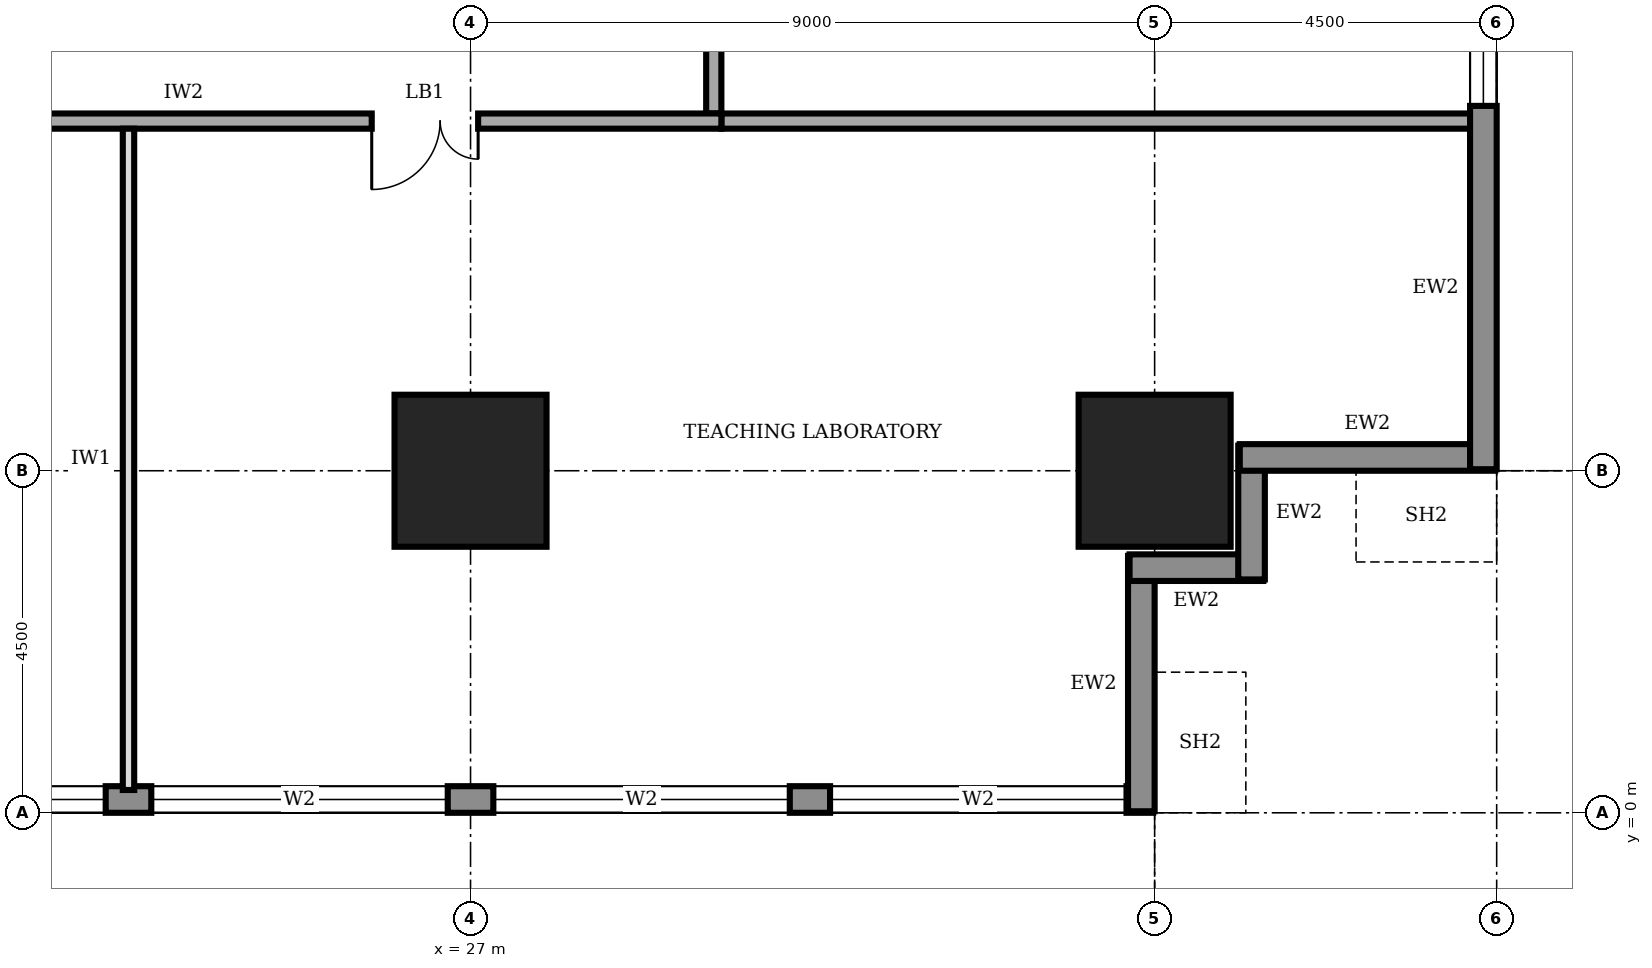
"""IFC4 building model, lengths in metres.
Left out: names, types, materials, properties, quantities, classifications, styles, units other than length and angle.
Written with IfcOpenShell. Run it as: python <this file> out.ifc"""

import sys

from ifc_helpers import new_model, si_unit, direction, frame, frame_2d, origin, origin_2d, place, context, subcontext, project, spatial, rectangle, extrude, element, fill, save


model = new_model("IFC4")
c1 = context("Model", 3, precision=1e-05, world=origin(), true_north=direction((0.0, 1.0)))
c2 = subcontext(c1, "Body", "Model", "MODEL_VIEW")
j1 = project(units=[si_unit("LENGTHUNIT", "METRE"), si_unit("PLANEANGLEUNIT", "RADIAN")], contexts=[c1])
p1 = place(None, origin())
s1 = spatial("IfcSite", under=j1, at=p1, CompositionType="ELEMENT")
p2 = place(p1, origin())
s2 = spatial("IfcBuilding", under=s1, at=p2, CompositionType="ELEMENT")
p3 = place(p2, frame((0.0, 0.0, 65.0)))
s3 = spatial("IfcBuildingStorey", under=s2, at=p3, CompositionType="ELEMENT", Elevation=65.0)
for number, where, z_axis, x_axis in (
    (1, (27.0, 4.5, 0.0), (0.0, 0.0, 1.0), (1.0, 0.0, 0.0)),
    (2, (36.0, 4.5, 0.0), (0.0, 0.0, 1.0), (1.0, 0.0, 0.0)),
):
    element("IfcColumn", number, at=place(p3, frame(where, z_axis=z_axis, x_axis=x_axis)), inside=s3, PredefinedType="COLUMN", context=c2, shape_type="SweptSolid", body=[
        extrude(rectangle(XDim=2.0, YDim=2.0, at=origin_2d()), origin(), (0.0, 0.0, 1.0), 4.0),
    ])
p4 = place(p3, frame((4.52, 0.175, 0.0), z_axis=(0.0, 0.0, 1.0), x_axis=(1.0, 0.0, 0.0)))
e3 = element("IfcWall", 3, at=p4, inside=s3, PredefinedType="STANDARD", context=c2, shape_type="SweptSolid", body=[
    extrude(rectangle(XDim=31.46, YDim=0.35, at=frame_2d((15.73, 0.0))), origin(), (0.0, 0.0, 1.0), 3.75),
])
p5 = place(p4, frame((4.78, 0.0, 0.6)))
e4 = element("IfcOpeningElement", 4, at=p5, cuts=e3, PredefinedType="OPENING", context=c2, shape_type="SweptSolid", body=[
    extrude(rectangle(XDim=3.9, YDim=2.6, at=frame_2d((1.95, 1.3))), frame((0.0, 0.185, 0.0), z_axis=(0.0, -1.0, 0.0), x_axis=(1.0, 0.0, 0.0)), (0.0, 0.0, 1.0), 0.37),
])
p6 = place(p4, frame((9.28, 0.0, 0.6)))
e5 = element("IfcOpeningElement", 5, at=p6, cuts=e3, PredefinedType="OPENING", context=c2, shape_type="SweptSolid", body=[
    extrude(rectangle(XDim=3.9, YDim=2.6, at=frame_2d((1.95, 1.3))), frame((0.0, 0.185, 0.0), z_axis=(0.0, -1.0, 0.0), x_axis=(1.0, 0.0, 0.0)), (0.0, 0.0, 1.0), 0.37),
])
p7 = place(p4, frame((13.78, 0.0, 0.6)))
e6 = element("IfcOpeningElement", 6, at=p7, cuts=e3, PredefinedType="OPENING", context=c2, shape_type="SweptSolid", body=[
    extrude(rectangle(XDim=3.9, YDim=2.6, at=frame_2d((1.95, 1.3))), frame((0.0, 0.185, 0.0), z_axis=(0.0, -1.0, 0.0), x_axis=(1.0, 0.0, 0.0)), (0.0, 0.0, 1.0), 0.37),
])
p8 = place(p4, frame((18.28, 0.0, 0.6)))
e7 = element("IfcOpeningElement", 7, at=p8, cuts=e3, PredefinedType="OPENING", context=c2, shape_type="SweptSolid", body=[
    extrude(rectangle(XDim=3.9, YDim=2.6, at=frame_2d((1.95, 1.3))), frame((0.0, 0.185, 0.0), z_axis=(0.0, -1.0, 0.0), x_axis=(1.0, 0.0, 0.0)), (0.0, 0.0, 1.0), 0.37),
])
p9 = place(p4, frame((22.78, 0.0, 0.6)))
e8 = element("IfcOpeningElement", 8, at=p9, cuts=e3, PredefinedType="OPENING", context=c2, shape_type="SweptSolid", body=[
    extrude(rectangle(XDim=3.9, YDim=2.6, at=frame_2d((1.95, 1.3))), frame((0.0, 0.185, 0.0), z_axis=(0.0, -1.0, 0.0), x_axis=(1.0, 0.0, 0.0)), (0.0, 0.0, 1.0), 0.37),
])
p10 = place(p4, frame((27.21, 0.0, 0.6)))
e9 = element("IfcOpeningElement", 9, at=p10, cuts=e3, PredefinedType="OPENING", context=c2, shape_type="SweptSolid", body=[
    extrude(rectangle(XDim=3.9, YDim=2.6, at=frame_2d((1.95, 1.3))), frame((0.0, 0.185, 0.0), z_axis=(0.0, -1.0, 0.0), x_axis=(1.0, 0.0, 0.0)), (0.0, 0.0, 1.0), 0.37),
])
p11 = place(p3, frame((35.825, 0.02, 0.0), z_axis=(0.0, 0.0, 1.0), x_axis=(0.0, 1.0, 0.0)))
e10 = element("IfcWall", 10, at=p11, inside=s3, PredefinedType="STANDARD", context=c2, shape_type="SweptSolid", body=[
    extrude(rectangle(XDim=3.36, YDim=0.35, at=frame_2d((1.68, 0.0))), origin(), (0.0, 0.0, 1.0), 2.85),
])
for number, where, z_axis, x_axis in (
    (11, (35.67, 3.225, 0.0), (0.0, 0.0, 1.0), (1.0, 0.0, 0.0)),
    (12, (37.275, 3.07, 0.0), (0.0, 0.0, 1.0), (0.0, 1.0, 0.0)),
):
    element("IfcWall", number, at=place(p3, frame(where, z_axis=z_axis, x_axis=x_axis)), inside=s3, PredefinedType="STANDARD", context=c2, shape_type="SweptSolid", body=[
        extrude(rectangle(XDim=1.76, YDim=0.35, at=frame_2d((0.88, 0.0))), origin(), (0.0, 0.0, 1.0), 3.75),
    ])
p12 = place(p3, frame((37.12, 4.675, 0.0), z_axis=(0.0, 0.0, 1.0), x_axis=(1.0, 0.0, 0.0)))
e13 = element("IfcWall", 13, at=p12, inside=s3, PredefinedType="STANDARD", context=c2, shape_type="SweptSolid", body=[
    extrude(rectangle(XDim=3.36, YDim=0.35, at=frame_2d((1.68, 0.0))), origin(), (0.0, 0.0, 1.0), 2.85),
])
p13 = place(p3, frame((40.325, 4.52, 0.0), z_axis=(0.0, 0.0, 1.0), x_axis=(0.0, 1.0, 0.0)))
e14 = element("IfcWall", 14, at=p13, inside=s3, PredefinedType="STANDARD", context=c2, shape_type="SweptSolid", body=[
    extrude(rectangle(XDim=31.46, YDim=0.35, at=frame_2d((15.73, 0.0))), origin(), (0.0, 0.0, 1.0), 3.75),
])
p14 = place(p13, frame((4.78, 0.0, 0.6)))
e15 = element("IfcOpeningElement", 15, at=p14, cuts=e14, PredefinedType="OPENING", context=c2, shape_type="SweptSolid", body=[
    extrude(rectangle(XDim=3.9, YDim=2.6, at=frame_2d((1.95, 1.3))), frame((0.0, 0.185, 0.0), z_axis=(0.0, -1.0, 0.0), x_axis=(1.0, 0.0, 0.0)), (0.0, 0.0, 1.0), 0.37),
])
p15 = place(p13, frame((9.28, 0.0, 0.6)))
e16 = element("IfcOpeningElement", 16, at=p15, cuts=e14, PredefinedType="OPENING", context=c2, shape_type="SweptSolid", body=[
    extrude(rectangle(XDim=3.9, YDim=2.6, at=frame_2d((1.95, 1.3))), frame((0.0, 0.185, 0.0), z_axis=(0.0, -1.0, 0.0), x_axis=(1.0, 0.0, 0.0)), (0.0, 0.0, 1.0), 0.37),
])
p16 = place(p13, frame((13.78, 0.0, 0.6)))
e17 = element("IfcOpeningElement", 17, at=p16, cuts=e14, PredefinedType="OPENING", context=c2, shape_type="SweptSolid", body=[
    extrude(rectangle(XDim=3.9, YDim=2.6, at=frame_2d((1.95, 1.3))), frame((0.0, 0.185, 0.0), z_axis=(0.0, -1.0, 0.0), x_axis=(1.0, 0.0, 0.0)), (0.0, 0.0, 1.0), 0.37),
])
p17 = place(p13, frame((18.28, 0.0, 0.6)))
e18 = element("IfcOpeningElement", 18, at=p17, cuts=e14, PredefinedType="OPENING", context=c2, shape_type="SweptSolid", body=[
    extrude(rectangle(XDim=3.9, YDim=2.6, at=frame_2d((1.95, 1.3))), frame((0.0, 0.185, 0.0), z_axis=(0.0, -1.0, 0.0), x_axis=(1.0, 0.0, 0.0)), (0.0, 0.0, 1.0), 0.37),
])
p18 = place(p13, frame((22.78, 0.0, 0.6)))
e19 = element("IfcOpeningElement", 19, at=p18, cuts=e14, PredefinedType="OPENING", context=c2, shape_type="SweptSolid", body=[
    extrude(rectangle(XDim=3.9, YDim=2.6, at=frame_2d((1.95, 1.3))), frame((0.0, 0.185, 0.0), z_axis=(0.0, -1.0, 0.0), x_axis=(1.0, 0.0, 0.0)), (0.0, 0.0, 1.0), 0.37),
])
p19 = place(p13, frame((27.21, 0.0, 0.6)))
e20 = element("IfcOpeningElement", 20, at=p19, cuts=e14, PredefinedType="OPENING", context=c2, shape_type="SweptSolid", body=[
    extrude(rectangle(XDim=3.9, YDim=2.6, at=frame_2d((1.95, 1.3))), frame((0.0, 0.185, 0.0), z_axis=(0.0, -1.0, 0.0), x_axis=(1.0, 0.0, 0.0)), (0.0, 0.0, 1.0), 0.37),
])
p20 = place(p3, frame((11.9, 9.1, 0.0), z_axis=(0.0, 0.0, 1.0), x_axis=(1.0, 0.0, 0.0)))
e21 = element("IfcWall", 21, at=p20, inside=s3, PredefinedType="SOLIDWALL", context=c2, shape_type="SweptSolid", body=[
    extrude(rectangle(XDim=18.4, YDim=0.2, at=frame_2d((9.2, 0.0))), origin(), (0.0, 0.0, 1.0), 3.75),
])
p21 = place(p20, frame((2.25, 0.0, 0.0)))
e22 = element("IfcOpeningElement", 22, at=p21, cuts=e21, PredefinedType="OPENING", context=c2, shape_type="SweptSolid", body=[
    extrude(rectangle(XDim=1.4, YDim=2.1, at=frame_2d((0.7, 1.05))), frame((0.0, 0.11, 0.0), z_axis=(0.0, -1.0, 0.0), x_axis=(1.0, 0.0, 0.0)), (0.0, 0.0, 1.0), 0.22),
])
p22 = place(p20, frame((7.85, 0.0, 0.0)))
e23 = element("IfcOpeningElement", 23, at=p22, cuts=e21, PredefinedType="OPENING", context=c2, shape_type="SweptSolid", body=[
    extrude(rectangle(XDim=1.0, YDim=2.1, at=frame_2d((0.5, 1.05))), frame((0.0, 0.11, 0.0), z_axis=(0.0, -1.0, 0.0), x_axis=(1.0, 0.0, 0.0)), (0.0, 0.0, 1.0), 0.22),
])
p23 = place(p20, frame((13.8, 0.0, 0.0)))
e24 = element("IfcOpeningElement", 24, at=p23, cuts=e21, PredefinedType="OPENING", context=c2, shape_type="SweptSolid", body=[
    extrude(rectangle(XDim=1.4, YDim=2.1, at=frame_2d((0.7, 1.05))), frame((0.0, 0.11, 0.0), z_axis=(0.0, -1.0, 0.0), x_axis=(1.0, 0.0, 0.0)), (0.0, 0.0, 1.0), 0.22),
])
p24 = place(p3, frame((30.2, 9.2, 0.0), z_axis=(0.0, 0.0, 1.0), x_axis=(0.0, 1.0, 0.0)))
e25 = element("IfcWall", 25, at=p24, inside=s3, PredefinedType="SOLIDWALL", context=c2, shape_type="SweptSolid", body=[
    extrude(rectangle(XDim=22.3, YDim=0.2, at=frame_2d((11.15, 0.0))), origin(), (0.0, 0.0, 1.0), 3.75),
])
p25 = place(p24, frame((5.85, 0.0, 0.0)))
e26 = element("IfcOpeningElement", 26, at=p25, cuts=e25, PredefinedType="OPENING", context=c2, shape_type="SweptSolid", body=[
    extrude(rectangle(XDim=1.4, YDim=2.1, at=frame_2d((0.7, 1.05))), frame((0.0, 0.11, 0.0), z_axis=(0.0, -1.0, 0.0), x_axis=(1.0, 0.0, 0.0)), (0.0, 0.0, 1.0), 0.22),
])
p26 = place(p24, frame((17.3, 0.0, 0.0)))
e27 = element("IfcOpeningElement", 27, at=p26, cuts=e25, PredefinedType="OPENING", context=c2, shape_type="SweptSolid", body=[
    extrude(rectangle(XDim=1.0, YDim=2.1, at=frame_2d((0.5, 1.05))), frame((0.0, 0.11, 0.0), z_axis=(0.0, -1.0, 0.0), x_axis=(1.0, 0.0, 0.0)), (0.0, 0.0, 1.0), 0.22),
])
p27 = place(p3, frame((30.3, 9.1, 0.0), z_axis=(0.0, 0.0, 1.0), x_axis=(1.0, 0.0, 0.0)))
e28 = element("IfcWall", 28, at=p27, inside=s3, PredefinedType="SOLIDWALL", context=c2, shape_type="SweptSolid", body=[
    extrude(rectangle(XDim=9.9, YDim=0.2, at=frame_2d((4.95, 0.0))), origin(), (0.0, 0.0, 1.0), 3.75),
])
p28 = place(p3, frame((22.5, 0.3, 0.0), z_axis=(0.0, 0.0, 1.0), x_axis=(0.0, 1.0, 0.0)))
e29 = element("IfcWall", 29, at=p28, inside=s3, PredefinedType="PARTITIONING", context=c2, shape_type="SweptSolid", body=[
    extrude(rectangle(XDim=8.7, YDim=0.15, at=frame_2d((4.35, 0.0))), origin(), (0.0, 0.0, 1.0), 3.75),
])
p29 = place(p7, origin())
e30 = element("IfcWindow", 30, at=p29, inside=s3, PartitioningType="SINGLE_PANEL", PredefinedType="WINDOW", context=c2, shape_type="SweptSolid", body=[
    extrude(rectangle(XDim=3.9, YDim=2.6, at=frame_2d((1.95, 1.3))), frame((0.0, 0.03, 0.0), z_axis=(0.0, -1.0, 0.0), x_axis=(1.0, 0.0, 0.0)), (0.0, 0.0, 1.0), 0.06),
])
fill(e6, e30)
p30 = place(p8, origin())
e31 = element("IfcWindow", 31, at=p30, inside=s3, PartitioningType="SINGLE_PANEL", PredefinedType="WINDOW", context=c2, shape_type="SweptSolid", body=[
    extrude(rectangle(XDim=3.9, YDim=2.6, at=frame_2d((1.95, 1.3))), frame((0.0, 0.03, 0.0), z_axis=(0.0, -1.0, 0.0), x_axis=(1.0, 0.0, 0.0)), (0.0, 0.0, 1.0), 0.06),
])
fill(e7, e31)
p31 = place(p9, origin())
e32 = element("IfcWindow", 32, at=p31, inside=s3, PartitioningType="SINGLE_PANEL", PredefinedType="WINDOW", context=c2, shape_type="SweptSolid", body=[
    extrude(rectangle(XDim=3.9, YDim=2.6, at=frame_2d((1.95, 1.3))), frame((0.0, 0.03, 0.0), z_axis=(0.0, -1.0, 0.0), x_axis=(1.0, 0.0, 0.0)), (0.0, 0.0, 1.0), 0.06),
])
fill(e8, e32)
p32 = place(p10, origin())
e33 = element("IfcWindow", 33, at=p32, inside=s3, PartitioningType="SINGLE_PANEL", PredefinedType="WINDOW", context=c2, shape_type="SweptSolid", body=[
    extrude(rectangle(XDim=3.9, YDim=2.6, at=frame_2d((1.95, 1.3))), frame((0.0, 0.03, 0.0), z_axis=(0.0, -1.0, 0.0), x_axis=(1.0, 0.0, 0.0)), (0.0, 0.0, 1.0), 0.06),
])
fill(e9, e33)
p33 = place(p14, origin())
e34 = element("IfcWindow", 34, at=p33, inside=s3, PartitioningType="SINGLE_PANEL", PredefinedType="WINDOW", context=c2, shape_type="SweptSolid", body=[
    extrude(rectangle(XDim=3.9, YDim=2.6, at=frame_2d((1.95, 1.3))), frame((0.0, 0.03, 0.0), z_axis=(0.0, -1.0, 0.0), x_axis=(1.0, 0.0, 0.0)), (0.0, 0.0, 1.0), 0.06),
])
fill(e15, e34)
p34 = place(p23, frame((1.4, 0.0, 0.0), z_axis=(0.0, 0.0, 1.0), x_axis=(-1.0, 0.0, 0.0)))
e35 = element("IfcDoor", 35, at=p34, inside=s3, OperationType="DOUBLE_DOOR_SINGLE_SWING", PredefinedType="DOOR", context=c2, shape_type="SweptSolid", body=[
    extrude(rectangle(XDim=1.4, YDim=2.1, at=frame_2d((0.7, 1.05))), frame((0.0, 0.025, 0.0), z_axis=(0.0, -1.0, 0.0), x_axis=(1.0, 0.0, 0.0)), (0.0, 0.0, 1.0), 0.05),
])
fill(e24, e35)
save(model, sys.argv[1])
